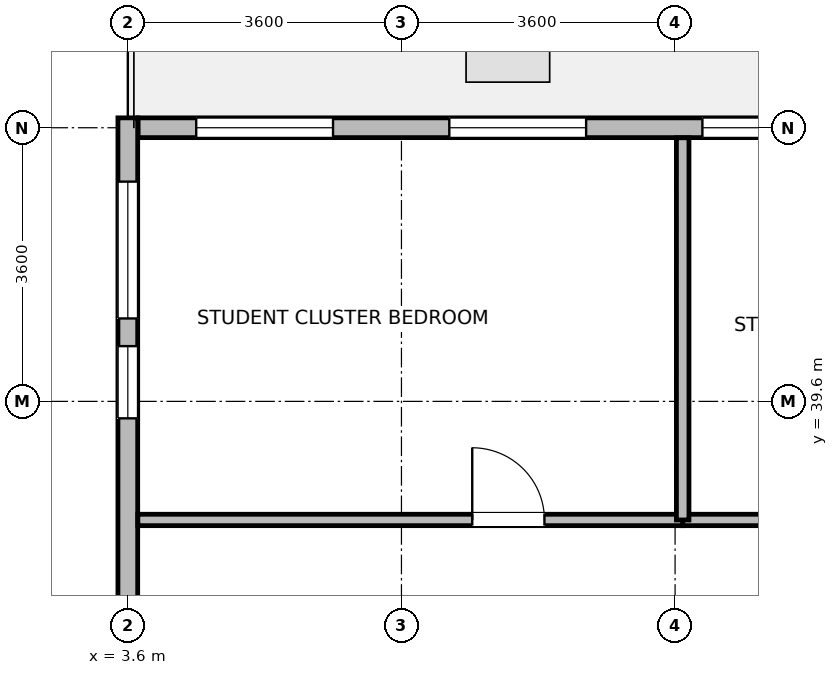
"""IFC4 building model, lengths in metres.
Left out: names, types, materials, properties, quantities, classifications, styles, units other than length and angle.
Written with IfcOpenShell. Run it as: python <this file> out.ifc"""

import sys

from ifc_helpers import new_model, si_unit, direction, frame, frame_2d, origin, place, context, subcontext, project, spatial, rectangle, extrude, element, fill, save


model = new_model("IFC4")
c1 = context("Model", 3, precision=1e-05, world=origin(), true_north=direction((0.0, 1.0)))
c2 = subcontext(c1, "Body", "Model", "MODEL_VIEW")
j1 = project(units=[si_unit("LENGTHUNIT", "METRE"), si_unit("PLANEANGLEUNIT", "RADIAN")], contexts=[c1])
p1 = place(None, origin())
s1 = spatial("IfcSite", under=j1, at=p1, CompositionType="ELEMENT")
p2 = place(p1, origin())
s2 = spatial("IfcBuilding", under=s1, at=p2, CompositionType="ELEMENT")
p3 = place(p2, frame((0.0, 0.0, 36.4)))
s3 = spatial("IfcBuildingStorey", under=s2, at=p3, CompositionType="ELEMENT", Elevation=36.4)
p4 = place(p3, frame((3.735, 43.2, 0.0), z_axis=(0.0, 0.0, 1.0), x_axis=(1.0, 0.0, 0.0)))
e1 = element("IfcWall", 1, at=p4, inside=s3, PredefinedType="STANDARD", context=c2, shape_type="SweptSolid", body=[
    extrude(rectangle(XDim=9.989, YDim=0.26, at=frame_2d((4.995, 0.0))), origin(), (0.0, 0.0, 1.0), 3.43),
])
p5 = place(p4, frame((0.765, 0.0, 0.85)))
e2 = element("IfcOpeningElement", 2, at=p5, cuts=e1, PredefinedType="OPENING", context=c2, shape_type="SweptSolid", body=[
    extrude(rectangle(XDim=1.8, YDim=1.85, at=frame_2d((0.9, 0.925))), frame((0.0, 0.14, 0.0), z_axis=(0.0, -1.0, 0.0), x_axis=(1.0, 0.0, 0.0)), (0.0, 0.0, 1.0), 0.28),
])
p6 = place(p4, frame((4.094, 0.0, 0.85)))
e3 = element("IfcOpeningElement", 3, at=p6, cuts=e1, PredefinedType="OPENING", context=c2, shape_type="SweptSolid", body=[
    extrude(rectangle(XDim=1.8, YDim=1.85, at=frame_2d((0.9, 0.925))), frame((0.0, 0.14, 0.0), z_axis=(0.0, -1.0, 0.0), x_axis=(1.0, 0.0, 0.0)), (0.0, 0.0, 1.0), 0.28),
])
p7 = place(p4, frame((7.424, 0.0, 0.85)))
e4 = element("IfcOpeningElement", 4, at=p7, cuts=e1, PredefinedType="OPENING", context=c2, shape_type="SweptSolid", body=[
    extrude(rectangle(XDim=1.8, YDim=1.85, at=frame_2d((0.9, 0.925))), frame((0.0, 0.14, 0.0), z_axis=(0.0, -1.0, 0.0), x_axis=(1.0, 0.0, 0.0)), (0.0, 0.0, 1.0), 0.28),
])
p8 = place(p3, frame((3.6, 36.374, 0.0), z_axis=(0.0, 0.0, 1.0), x_axis=(0.0, 1.0, 0.0)))
e5 = element("IfcWall", 5, at=p8, inside=s3, PredefinedType="STANDARD", context=c2, shape_type="SweptSolid", body=[
    extrude(rectangle(XDim=6.956, YDim=0.26, at=frame_2d((3.478, 0.0))), origin(), (0.0, 0.0, 1.0), 3.43),
])
p9 = place(p8, frame((4.317, 0.0, 0.85)))
e6 = element("IfcOpeningElement", 6, at=p9, cuts=e5, PredefinedType="OPENING", context=c2, shape_type="SweptSolid", body=[
    extrude(rectangle(XDim=1.8, YDim=1.85, at=frame_2d((0.9, 0.925))), frame((0.0, 0.14, 0.0), z_axis=(0.0, -1.0, 0.0), x_axis=(1.0, 0.0, 0.0)), (0.0, 0.0, 1.0), 0.28),
])
p10 = place(p8, frame((3.003, 0.0, 0.85)))
e7 = element("IfcOpeningElement", 7, at=p10, cuts=e5, PredefinedType="OPENING", context=c2, shape_type="SweptSolid", body=[
    extrude(rectangle(XDim=0.95, YDim=1.75, at=frame_2d((0.475, 0.875))), frame((0.0, 0.14, 0.0), z_axis=(0.0, -1.0, 0.0), x_axis=(1.0, 0.0, 0.0)), (0.0, 0.0, 1.0), 0.28),
])
p11 = place(p3, frame((10.9, 38.04, 0.0), z_axis=(0.0, 0.0, 1.0), x_axis=(1.0, 0.0, 0.0)))
e8 = element("IfcWall", 8, at=p11, inside=s3, PredefinedType="PARTITIONING", context=c2, shape_type="SweptSolid", body=[
    extrude(rectangle(XDim=7.84, YDim=0.15, at=frame_2d((3.92, 0.0))), origin(), (0.0, 0.0, 1.0), 3.43),
])
p12 = place(p11, frame((4.856, 0.0, 0.0)))
e9 = element("IfcOpeningElement", 9, at=p12, cuts=e8, PredefinedType="OPENING", context=c2, shape_type="SweptSolid", body=[
    extrude(rectangle(XDim=0.95, YDim=2.1, at=frame_2d((0.475, 1.05))), frame((0.0, 0.085, 0.0), z_axis=(0.0, -1.0, 0.0), x_axis=(1.0, 0.0, 0.0)), (0.0, 0.0, 1.0), 0.17),
])
p13 = place(p3, frame((3.732, 38.04, 0.0), z_axis=(0.0, 0.0, 1.0), x_axis=(1.0, 0.0, 0.0)))
e10 = element("IfcWall", 10, at=p13, inside=s3, PredefinedType="PARTITIONING", context=c2, shape_type="SweptSolid", body=[
    extrude(rectangle(XDim=7.168, YDim=0.15, at=frame_2d((3.584, 0.0))), origin(), (0.0, 0.0, 1.0), 3.43),
])
p14 = place(p13, frame((4.399, 0.0, 0.0)))
e11 = element("IfcOpeningElement", 11, at=p14, cuts=e10, PredefinedType="OPENING", context=c2, shape_type="SweptSolid", body=[
    extrude(rectangle(XDim=0.95, YDim=2.1, at=frame_2d((0.475, 1.05))), frame((0.0, 0.085, 0.0), z_axis=(0.0, -1.0, 0.0), x_axis=(1.0, 0.0, 0.0)), (0.0, 0.0, 1.0), 0.17),
])
p15 = place(p3, frame((10.9, 38.04, 0.0), z_axis=(0.0, 0.0, 1.0), x_axis=(0.0, 1.0, 0.0)))
e12 = element("IfcWall", 12, at=p15, inside=s3, PredefinedType="PARTITIONING", context=c2, shape_type="SweptSolid", body=[
    extrude(rectangle(XDim=5.028, YDim=0.165, at=frame_2d((2.514, 0.0))), origin(), (0.0, 0.0, 1.0), 3.43),
])
p16 = place(p5, origin())
e13 = element("IfcWindow", 13, at=p16, inside=s3, PartitioningType="SINGLE_PANEL", PredefinedType="WINDOW", context=c2, shape_type="SweptSolid", body=[
    extrude(rectangle(XDim=1.8, YDim=1.85, at=frame_2d((0.9, 0.925))), frame((0.0, 0.03, 0.0), z_axis=(0.0, -1.0, 0.0), x_axis=(1.0, 0.0, 0.0)), (0.0, 0.0, 1.0), 0.06),
])
fill(e2, e13)
p17 = place(p6, origin())
e14 = element("IfcWindow", 14, at=p17, inside=s3, PartitioningType="SINGLE_PANEL", PredefinedType="WINDOW", context=c2, shape_type="SweptSolid", body=[
    extrude(rectangle(XDim=1.8, YDim=1.85, at=frame_2d((0.9, 0.925))), frame((0.0, 0.03, 0.0), z_axis=(0.0, -1.0, 0.0), x_axis=(1.0, 0.0, 0.0)), (0.0, 0.0, 1.0), 0.06),
])
fill(e3, e14)
p18 = place(p7, origin())
e15 = element("IfcWindow", 15, at=p18, inside=s3, PartitioningType="SINGLE_PANEL", PredefinedType="WINDOW", context=c2, shape_type="SweptSolid", body=[
    extrude(rectangle(XDim=1.8, YDim=1.85, at=frame_2d((0.9, 0.925))), frame((0.0, 0.03, 0.0), z_axis=(0.0, -1.0, 0.0), x_axis=(1.0, 0.0, 0.0)), (0.0, 0.0, 1.0), 0.06),
])
fill(e4, e15)
p19 = place(p9, origin())
e16 = element("IfcWindow", 16, at=p19, inside=s3, PartitioningType="SINGLE_PANEL", PredefinedType="WINDOW", context=c2, shape_type="SweptSolid", body=[
    extrude(rectangle(XDim=1.8, YDim=1.85, at=frame_2d((0.9, 0.925))), frame((0.0, 0.03, 0.0), z_axis=(0.0, -1.0, 0.0), x_axis=(1.0, 0.0, 0.0)), (0.0, 0.0, 1.0), 0.06),
])
fill(e6, e16)
p20 = place(p10, origin())
e17 = element("IfcWindow", 17, at=p20, inside=s3, PartitioningType="SINGLE_PANEL", PredefinedType="WINDOW", context=c2, shape_type="SweptSolid", body=[
    extrude(rectangle(XDim=0.95, YDim=1.75, at=frame_2d((0.475, 0.875))), frame((0.0, 0.03, 0.0), z_axis=(0.0, -1.0, 0.0), x_axis=(1.0, 0.0, 0.0)), (0.0, 0.0, 1.0), 0.06),
])
fill(e7, e17)
p21 = place(p14, origin())
e18 = element("IfcDoor", 18, at=p21, inside=s3, OperationType="SINGLE_SWING_LEFT", PredefinedType="DOOR", context=c2, shape_type="SweptSolid", body=[
    extrude(rectangle(XDim=0.95, YDim=2.1, at=frame_2d((0.475, 1.05))), frame((0.0, 0.025, 0.0), z_axis=(0.0, -1.0, 0.0), x_axis=(1.0, 0.0, 0.0)), (0.0, 0.0, 1.0), 0.05),
])
fill(e11, e18)
save(model, sys.argv[1])
